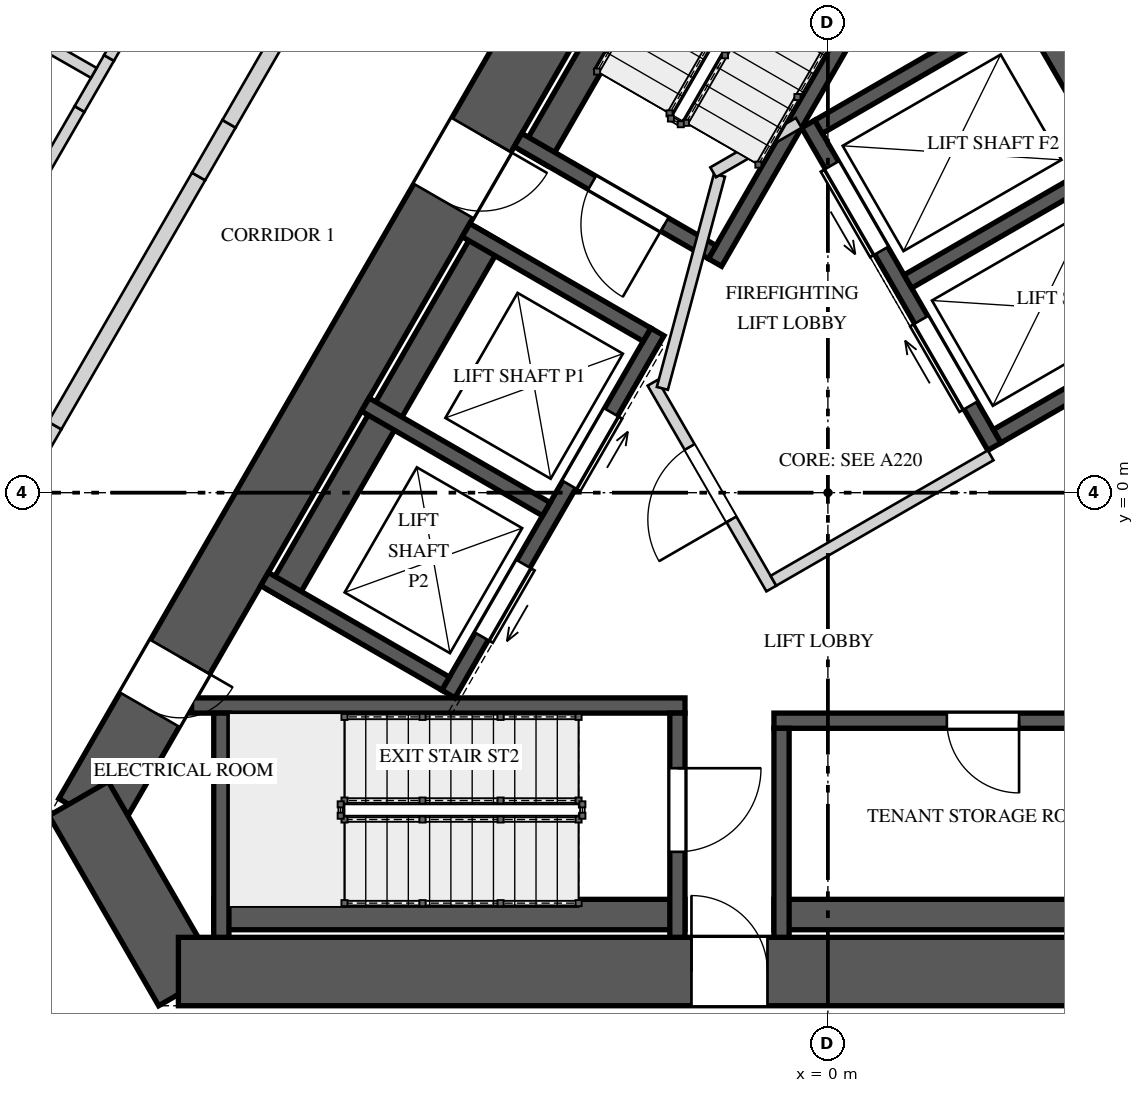
"""IFC4 building model, lengths in metres.
Left out: names, types, materials, properties, quantities, classifications, styles, units other than length and angle.
Written with IfcOpenShell. Run it as: python <this file> out.ifc"""

import sys

from ifc_helpers import new_model, si_unit, direction, frame, frame_2d, origin, place, context, subcontext, project, spatial, rectangle, extrude, element, fill, save


model = new_model("IFC4")
c1 = context("Model", 3, precision=1e-05, world=origin(), true_north=direction((0.0, 1.0)))
c2 = subcontext(c1, "Body", "Model", "MODEL_VIEW")
j1 = project(units=[si_unit("LENGTHUNIT", "METRE"), si_unit("PLANEANGLEUNIT", "RADIAN")], contexts=[c1])
p1 = place(None, origin())
s1 = spatial("IfcSite", under=j1, at=p1, CompositionType="ELEMENT")
p2 = place(p1, origin())
s2 = spatial("IfcBuilding", under=s1, at=p2, CompositionType="ELEMENT")
p3 = place(p2, frame((0.0, 0.0, 133.6)))
s3 = spatial("IfcBuildingStorey", under=s2, at=p3, CompositionType="ELEMENT", Elevation=133.6)
p4 = place(p3, frame((-1.184, 10.55, 0.0), z_axis=(0.0, 0.0, 1.0), x_axis=(-0.500004814304, -0.866022624227, 0.0)))
e1 = element("IfcWall", 1, at=p4, inside=s3, PredefinedType="SHEAR", context=c2, shape_type="SweptSolid", body=[
    extrude(rectangle(XDim=17.09, YDim=0.9, at=frame_2d((8.545, 0.0))), origin(), (0.0, 0.0, 1.0), 4.0),
])
p5 = place(p4, frame((6.75, 0.0, 0.0)))
e2 = element("IfcOpeningElement", 2, at=p5, cuts=e1, PredefinedType="OPENING", context=c2, shape_type="SweptSolid", body=[
    extrude(rectangle(XDim=1.0, YDim=2.4, at=frame_2d((0.5, 1.2))), frame((0.0, 0.46, 0.0), z_axis=(0.0, -1.0, 0.0), x_axis=(1.0, 0.0, 0.0)), (0.0, 0.0, 1.0), 0.92),
])
p6 = place(p4, frame((14.678, 0.0, 0.0)))
e3 = element("IfcOpeningElement", 3, at=p6, cuts=e1, PredefinedType="OPENING", context=c2, shape_type="SweptSolid", body=[
    extrude(rectangle(XDim=0.8, YDim=2.1, at=frame_2d((0.4, 1.05))), frame((0.0, 0.46, 0.0), z_axis=(0.0, -1.0, 0.0), x_axis=(1.0, 0.0, 0.0)), (0.0, 0.0, 1.0), 0.92),
])
p7 = place(p3, frame((-9.858, -4.025, 0.0), z_axis=(0.0, 0.0, 1.0), x_axis=(0.500059191753, -0.865991226713, 0.0)))
e4 = element("IfcWall", 4, at=p7, inside=s3, PredefinedType="SHEAR", context=c2, shape_type="SweptSolid", body=[
    extrude(rectangle(XDim=2.887, YDim=0.9, at=frame_2d((1.443, 0.0))), origin(), (0.0, 0.0, 1.0), 4.0),
])
p8 = place(p3, frame((-8.545, -6.3, 0.0), z_axis=(0.0, 0.0, 1.0), x_axis=(1.0, 0.0, 0.0)))
e5 = element("IfcWall", 5, at=p8, inside=s3, PredefinedType="SHEAR", context=c2, shape_type="SweptSolid", body=[
    extrude(rectangle(XDim=17.09, YDim=0.9, at=frame_2d((8.545, 0.0))), origin(), (0.0, 0.0, 1.0), 4.0),
])
p9 = place(p8, frame((6.75, 0.0, 0.0)))
e6 = element("IfcOpeningElement", 6, at=p9, cuts=e5, PredefinedType="OPENING", context=c2, shape_type="SweptSolid", body=[
    extrude(rectangle(XDim=1.0, YDim=2.4, at=frame_2d((0.5, 1.2))), frame((0.0, 0.46, 0.0), z_axis=(0.0, -1.0, 0.0), x_axis=(1.0, 0.0, 0.0)), (0.0, 0.0, 1.0), 0.92),
])
p10 = place(p3, frame((9.729, -4.25, 0.0), z_axis=(0.0, 0.0, 1.0), x_axis=(-0.500004814304, 0.866022624227, 0.0)))
e7 = element("IfcWall", 7, at=p10, inside=s3, PredefinedType="SHEAR", context=c2, shape_type="SweptSolid", body=[
    extrude(rectangle(XDim=17.09, YDim=0.9, at=frame_2d((8.545, 0.0))), origin(), (0.0, 0.0, 1.0), 4.0),
])
p11 = place(p10, frame((6.82, 0.0, 0.0)))
e8 = element("IfcOpeningElement", 8, at=p11, cuts=e7, PredefinedType="OPENING", context=c2, shape_type="SweptSolid", body=[
    extrude(rectangle(XDim=1.0, YDim=2.4, at=frame_2d((0.5, 1.2))), frame((0.0, 0.46, 0.0), z_axis=(0.0, -1.0, 0.0), x_axis=(1.0, 0.0, 0.0)), (0.0, 0.0, 1.0), 0.92),
])
p12 = place(p3, frame((-0.766, 9.772, 0.0), z_axis=(0.0, 0.0, 1.0), x_axis=(-0.500009909098, -0.866019682689, 0.0)))
e9 = element("IfcWall", 9, at=p12, inside=s3, PredefinedType="SOLIDWALL", context=c2, shape_type="SweptSolid", body=[
    extrude(rectangle(XDim=6.2, YDim=0.4, at=frame_2d((3.1, 0.0))), origin(), (0.0, 0.0, 1.0), 3.65),
])
p13 = place(p3, frame((1.761, 8.65, 0.0), z_axis=(0.0, 0.0, 1.0), x_axis=(-0.500010023241, -0.866019616786, 0.0)))
e10 = element("IfcWall", 10, at=p13, inside=s3, PredefinedType="SOLIDWALL", context=c2, shape_type="SweptSolid", body=[
    extrude(rectangle(XDim=6.491, YDim=0.2, at=frame_2d((3.246, 0.0))), origin(), (0.0, 0.0, 1.0), 3.65),
])
p14 = place(p3, frame((-1.521, 3.165, 0.0), z_axis=(0.0, 0.0, 1.0), x_axis=(-0.866039495442, 0.49997559174, 0.0)))
e11 = element("IfcWall", 11, at=p14, inside=s3, PredefinedType="SOLIDWALL", context=c2, shape_type="SweptSolid", body=[
    extrude(rectangle(XDim=2.95, YDim=0.2, at=frame_2d((1.475, 0.0))), origin(), (0.0, 0.0, 1.0), 3.65),
])
p15 = place(p14, frame((0.725, 0.0, 0.0)))
e12 = element("IfcOpeningElement", 12, at=p15, cuts=e11, PredefinedType="OPENING", context=c2, shape_type="SweptSolid", body=[
    extrude(rectangle(XDim=1.1, YDim=2.4, at=frame_2d((0.55, 1.2))), frame((0.0, 0.11, 0.0), z_axis=(0.0, -1.0, 0.0), x_axis=(1.0, 0.0, 0.0)), (0.0, 0.0, 1.0), 0.22),
])
p16 = place(p3, frame((-8.08, -5.55, 0.0), z_axis=(0.0, 0.0, 1.0), x_axis=(1.0, 0.0, 0.0)))
e13 = element("IfcWall", 13, at=p16, inside=s3, PredefinedType="SOLIDWALL", context=c2, shape_type="SweptSolid", body=[
    extrude(rectangle(XDim=6.2, YDim=0.4, at=frame_2d((3.1, 0.0))), origin(), (0.0, 0.0, 1.0), 3.65),
])
p17 = place(p3, frame((-8.372, -2.8, 0.0), z_axis=(0.0, 0.0, 1.0), x_axis=(1.0, 0.0, 0.0)))
e14 = element("IfcWall", 14, at=p17, inside=s3, PredefinedType="SOLIDWALL", context=c2, shape_type="SweptSolid", body=[
    extrude(rectangle(XDim=6.492, YDim=0.2, at=frame_2d((3.246, 0.0))), origin(), (0.0, 0.0, 1.0), 3.65),
])
p18 = place(p3, frame((-7.98, -2.9, 0.0), z_axis=(0.0, 0.0, 1.0), x_axis=(0.0, -1.0, 0.0)))
e15 = element("IfcWall", 15, at=p18, inside=s3, PredefinedType="SOLIDWALL", context=c2, shape_type="SweptSolid", body=[
    extrude(rectangle(XDim=2.95, YDim=0.2, at=frame_2d((1.475, 0.0))), origin(), (0.0, 0.0, 1.0), 3.65),
])
p19 = place(p3, frame((-1.98, -2.9, 0.0), z_axis=(0.0, 0.0, 1.0), x_axis=(0.0, -1.0, 0.0)))
e16 = element("IfcWall", 16, at=p19, inside=s3, PredefinedType="SOLIDWALL", context=c2, shape_type="SweptSolid", body=[
    extrude(rectangle(XDim=2.95, YDim=0.2, at=frame_2d((1.475, 0.0))), origin(), (0.0, 0.0, 1.0), 3.65),
])
p20 = place(p19, frame((0.725, 0.0, 0.0)))
e17 = element("IfcOpeningElement", 17, at=p20, cuts=e16, PredefinedType="OPENING", context=c2, shape_type="SweptSolid", body=[
    extrude(rectangle(XDim=1.1, YDim=2.4, at=frame_2d((0.55, 1.2))), frame((0.0, 0.11, 0.0), z_axis=(0.0, -1.0, 0.0), x_axis=(1.0, 0.0, 0.0)), (0.0, 0.0, 1.0), 0.22),
])
p21 = place(p3, frame((-2.243, 2.115, 0.0), z_axis=(0.0, 0.0, 1.0), x_axis=(-0.499996545922, -0.866027397988, 0.0)))
e18 = element("IfcWall", 18, at=p21, inside=s3, PredefinedType="SOLIDWALL", context=c2, shape_type="SweptSolid", body=[
    extrude(rectangle(XDim=5.5, YDim=0.2, at=frame_2d((2.75, 0.0))), origin(), (0.0, 0.0, 1.0), 3.65),
])
p22 = place(p21, frame((1.22, 0.0, 0.0)))
e19 = element("IfcOpeningElement", 19, at=p22, cuts=e18, PredefinedType="OPENING", context=c2, shape_type="SweptSolid", body=[
    extrude(rectangle(XDim=1.1, YDim=2.1, at=frame_2d((0.55, 1.05))), frame((0.0, 0.11, 0.0), z_axis=(0.0, -1.0, 0.0), x_axis=(1.0, 0.0, 0.0)), (0.0, 0.0, 1.0), 0.22),
])
p23 = place(p21, frame((3.525, 0.0, 0.0)))
e20 = element("IfcOpeningElement", 20, at=p23, cuts=e18, PredefinedType="OPENING", context=c2, shape_type="SweptSolid", body=[
    extrude(rectangle(XDim=1.1, YDim=2.1, at=frame_2d((0.55, 1.05))), frame((0.0, 0.11, 0.0), z_axis=(0.0, -1.0, 0.0), x_axis=(1.0, 0.0, 0.0)), (0.0, 0.0, 1.0), 0.22),
])
p24 = place(p3, frame((-4.451, 3.39, 0.0), z_axis=(0.0, 0.0, 1.0), x_axis=(-0.499996545922, -0.866027397988, 0.0)))
e21 = element("IfcWall", 21, at=p24, inside=s3, PredefinedType="SOLIDWALL", context=c2, shape_type="SweptSolid", body=[
    extrude(rectangle(XDim=5.5, YDim=0.4, at=frame_2d((2.75, 0.0))), origin(), (0.0, 0.0, 1.0), 3.65),
])
for number, where, z_axis, x_axis in (
    (22, (-2.38, 2.078, 0.0), (0.0, 0.0, 1.0), (-0.866, 0.5, 0.0)),
    (23, (-3.705, -0.217, 0.0), (0.0, 0.0, 1.0), (-0.866, 0.5, 0.0)),
):
    element("IfcWall", number, at=place(p3, frame(where, z_axis=z_axis, x_axis=x_axis)), inside=s3, PredefinedType="SOLIDWALL", context=c2, shape_type="SweptSolid", body=[
        extrude(rectangle(XDim=2.75, YDim=0.2, at=frame_2d((1.375, 0.0))), origin(), (0.0, 0.0, 1.0), 3.65),
    ])
p25 = place(p3, frame((-5.03, -2.512, 0.0), z_axis=(0.0, 0.0, 1.0), x_axis=(-0.866005201286, 0.500034990121, 0.0)))
e24 = element("IfcWall", 24, at=p25, inside=s3, PredefinedType="SOLIDWALL", context=c2, shape_type="SweptSolid", body=[
    extrude(rectangle(XDim=2.75, YDim=0.2, at=frame_2d((1.375, 0.0))), origin(), (0.0, 0.0, 1.0), 3.65),
])
p26 = place(p3, frame((4.79, -3.0, 0.0), z_axis=(0.0, 0.0, 1.0), x_axis=(-1.0, 0.0, 0.0)))
e25 = element("IfcWall", 25, at=p26, inside=s3, PredefinedType="SOLIDWALL", context=c2, shape_type="SweptSolid", body=[
    extrude(rectangle(XDim=5.5, YDim=0.2, at=frame_2d((2.75, 0.0))), origin(), (0.0, 0.0, 1.0), 3.65),
])
p27 = place(p26, frame((2.275, 0.0, 0.0)))
e26 = element("IfcOpeningElement", 26, at=p27, cuts=e25, PredefinedType="OPENING", context=c2, shape_type="SweptSolid", body=[
    extrude(rectangle(XDim=0.95, YDim=2.4, at=frame_2d((0.475, 1.2))), frame((0.0, 0.11, 0.0), z_axis=(0.0, -1.0, 0.0), x_axis=(1.0, 0.0, 0.0)), (0.0, 0.0, 1.0), 0.22),
])
p28 = place(p3, frame((-0.71, -5.55, 0.0), z_axis=(0.0, 0.0, 1.0), x_axis=(1.0, 0.0, 0.0)))
e27 = element("IfcWall", 27, at=p28, inside=s3, PredefinedType="SOLIDWALL", context=c2, shape_type="SweptSolid", body=[
    extrude(rectangle(XDim=5.5, YDim=0.4, at=frame_2d((2.75, 0.0))), origin(), (0.0, 0.0, 1.0), 3.65),
])
p29 = place(p3, frame((-0.61, -3.1, 0.0), z_axis=(0.0, 0.0, 1.0), x_axis=(0.0, -1.0, 0.0)))
e28 = element("IfcWall", 28, at=p29, inside=s3, PredefinedType="SOLIDWALL", context=c2, shape_type="SweptSolid", body=[
    extrude(rectangle(XDim=2.75, YDim=0.2, at=frame_2d((1.375, 0.0))), origin(), (0.0, 0.0, 1.0), 3.65),
])
p30 = place(p3, frame((2.19, 0.606, 0.0), z_axis=(0.0, 0.0, 1.0), x_axis=(-0.500002801628, 0.866023786258, 0.0)))
e29 = element("IfcWall", 29, at=p30, inside=s3, PredefinedType="SOLIDWALL", context=c2, shape_type="SweptSolid", body=[
    extrude(rectangle(XDim=4.9, YDim=0.2, at=frame_2d((2.45, 0.0))), origin(), (0.0, 0.0, 1.0), 3.65),
])
p31 = place(p30, frame((0.625, 0.0, 0.0)))
e30 = element("IfcOpeningElement", 30, at=p31, cuts=e29, PredefinedType="OPENING", context=c2, shape_type="SweptSolid", body=[
    extrude(rectangle(XDim=1.3, YDim=2.1, at=frame_2d((0.65, 1.05))), frame((0.0, 0.11, 0.0), z_axis=(0.0, -1.0, 0.0), x_axis=(1.0, 0.0, 0.0)), (0.0, 0.0, 1.0), 0.22),
])
p32 = place(p30, frame((2.975, 0.0, 0.0)))
e31 = element("IfcOpeningElement", 31, at=p32, cuts=e29, PredefinedType="OPENING", context=c2, shape_type="SweptSolid", body=[
    extrude(rectangle(XDim=1.3, YDim=2.1, at=frame_2d((0.65, 1.05))), frame((0.0, 0.11, 0.0), z_axis=(0.0, -1.0, 0.0), x_axis=(1.0, 0.0, 0.0)), (0.0, 0.0, 1.0), 0.22),
])
p33 = place(p3, frame((5.092, 2.281, 0.0), z_axis=(0.0, 0.0, 1.0), x_axis=(-0.500018594424, 0.866014668023, 0.0)))
e32 = element("IfcWall", 32, at=p33, inside=s3, PredefinedType="SOLIDWALL", context=c2, shape_type="SweptSolid", body=[
    extrude(rectangle(XDim=4.9, YDim=0.4, at=frame_2d((2.45, 0.0))), origin(), (0.0, 0.0, 1.0), 3.65),
])
for number, where, z_axis, x_axis in (
    (33, (2.227, 0.743, 0.0), (0.0, 0.0, 1.0), (0.866, 0.5, 0.0)),
    (34, (1.052, 2.778, 0.0), (0.0, 0.0, 1.0), (0.866, 0.5, 0.0)),
):
    element("IfcWall", number, at=place(p3, frame(where, z_axis=z_axis, x_axis=x_axis)), inside=s3, PredefinedType="SOLIDWALL", context=c2, shape_type="SweptSolid", body=[
        extrude(rectangle(XDim=3.55, YDim=0.2, at=frame_2d((1.775, 0.0))), origin(), (0.0, 0.0, 1.0), 3.65),
    ])
p34 = place(p3, frame((-0.123, 4.813, 0.0), z_axis=(0.0, 0.0, 1.0), x_axis=(0.865995461329, 0.500051858269, 0.0)))
e35 = element("IfcWall", 35, at=p34, inside=s3, PredefinedType="SOLIDWALL", context=c2, shape_type="SweptSolid", body=[
    extrude(rectangle(XDim=3.55, YDim=0.2, at=frame_2d((1.775, 0.0))), origin(), (0.0, 0.0, 1.0), 3.65),
])
p35 = place(p3, frame((-0.744, -1.261, 0.0), z_axis=(0.0, 0.0, 1.0), x_axis=(-0.500004234368, 0.866022959057, 0.0)))
e36 = element("IfcWall", 36, at=p35, inside=s3, PredefinedType="PARTITIONING", context=c2, shape_type="SweptSolid", body=[
    extrude(rectangle(XDim=3.125, YDim=0.15, at=frame_2d((1.562, 0.0))), origin(), (0.0, 0.0, 1.0), 3.65),
])
p36 = place(p35, frame((1.05, 0.0, 0.0)))
e37 = element("IfcOpeningElement", 37, at=p36, cuts=e36, PredefinedType="OPENING", context=c2, shape_type="SweptSolid", body=[
    extrude(rectangle(XDim=1.1, YDim=2.4, at=frame_2d((0.55, 1.2))), frame((0.0, 0.085, 0.0), z_axis=(0.0, -1.0, 0.0), x_axis=(1.0, 0.0, 0.0)), (0.0, 0.0, 1.0), 0.17),
])
p37 = place(p3, frame((-0.717, -1.159, 0.0), z_axis=(0.0, 0.0, 1.0), x_axis=(0.866008176907, 0.50002983664, 0.0)))
e38 = element("IfcWall", 38, at=p37, inside=s3, PredefinedType="PARTITIONING", context=c2, shape_type="SweptSolid", body=[
    extrude(rectangle(XDim=3.3, YDim=0.15, at=frame_2d((1.65, 0.0))), origin(), (0.0, 0.0, 1.0), 3.65),
])
p38 = place(p3, frame((-2.178, 1.372, 0.0), z_axis=(0.0, 0.0, 1.0), x_axis=(0.258808958833, 0.96592852884, 0.0)))
e39 = element("IfcWall", 39, at=p38, inside=s3, PredefinedType="PARTITIONING", context=c2, shape_type="SweptSolid", body=[
    extrude(rectangle(XDim=2.903, YDim=0.15, at=frame_2d((1.451, 0.0))), origin(), (0.0, 0.0, 1.0), 3.65),
])
p39 = place(p3, frame((-1.51, 4.215, 0.0), z_axis=(0.0, 0.0, 1.0), x_axis=(0.866085525409, 0.49989585183, 0.0)))
e40 = element("IfcWall", 40, at=p39, inside=s3, PredefinedType="PARTITIONING", context=c2, shape_type="SweptSolid", body=[
    extrude(rectangle(XDim=1.3, YDim=0.15, at=frame_2d((0.65, 0.0))), origin(), (0.0, 0.0, 1.0), 3.65),
])
p40 = place(p3, frame((-12.195, 0.977, 0.0), z_axis=(0.0, 0.0, 1.0), x_axis=(0.499993726502, 0.86602902576, 0.0)))
e41 = element("IfcWall", 41, at=p40, inside=s3, PredefinedType="PARTITIONING", context=c2, shape_type="SweptSolid", body=[
    extrude(rectangle(XDim=4.7, YDim=0.15, at=frame_2d((2.35, 0.0))), origin(), (0.0, 0.0, 1.0), 3.65),
])
p41 = place(p40, frame((2.03, 0.0, 0.0)))
e42 = element("IfcOpeningElement", 42, at=p41, cuts=e41, PredefinedType="OPENING", context=c2, shape_type="SweptSolid", body=[
    extrude(rectangle(XDim=0.95, YDim=2.4, at=frame_2d((0.475, 1.2))), frame((0.0, 0.085, 0.0), z_axis=(0.0, -1.0, 0.0), x_axis=(1.0, 0.0, 0.0)), (0.0, 0.0, 1.0), 0.17),
])
p42 = place(p3, frame((-9.845, 5.048, 0.0), z_axis=(0.0, 0.0, 1.0), x_axis=(0.499967891604, 0.866043940782, 0.0)))
e43 = element("IfcWall", 43, at=p42, inside=s3, PredefinedType="PARTITIONING", context=c2, shape_type="SweptSolid", body=[
    extrude(rectangle(XDim=0.775, YDim=0.15, at=frame_2d((0.387, 0.0))), origin(), (0.0, 0.0, 1.0), 2.75),
])
p43 = place(p3, frame((-9.458, 5.719, 0.0), z_axis=(0.0, 0.0, 1.0), x_axis=(0.499996941814, 0.866027169422, 0.0)))
e44 = element("IfcWall", 44, at=p43, inside=s3, PredefinedType="PARTITIONING", context=c2, shape_type="SweptSolid", body=[
    extrude(rectangle(XDim=2.797, YDim=0.15, at=frame_2d((1.399, 0.0))), origin(), (0.0, 0.0, 1.0), 3.65),
])
p44 = place(p43, frame((1.1, 0.0, 0.0)))
e45 = element("IfcOpeningElement", 45, at=p44, cuts=e44, PredefinedType="OPENING", context=c2, shape_type="SweptSolid", body=[
    extrude(rectangle(XDim=0.95, YDim=2.4, at=frame_2d((0.475, 1.2))), frame((0.0, 0.085, 0.0), z_axis=(0.0, -1.0, 0.0), x_axis=(1.0, 0.0, 0.0)), (0.0, 0.0, 1.0), 0.17),
])
p45 = place(p3, frame((-9.658, 5.522, 0.0), z_axis=(0.0, 0.0, 1.0), x_axis=(-0.868078092768, 0.496427663267, 0.0)))
e46 = element("IfcWall", 46, at=p45, inside=s3, PredefinedType="PARTITIONING", context=c2, shape_type="SweptSolid", body=[
    extrude(rectangle(XDim=7.467, YDim=0.15, at=frame_2d((3.733, 0.0))), origin(), (0.0, 0.0, 1.0), 2.75),
])
p46 = place(p3, frame((-10.564, 0.203, 0.0), z_axis=(0.0, 0.0, 1.0), x_axis=(0.499982474044, 0.866035522163, 0.0)))
e47 = element("IfcWall", 47, at=p46, inside=s3, PredefinedType="SOLIDWALL", context=c2, shape_type="SweptSolid", body=[
    extrude(rectangle(XDim=0.786, YDim=0.2, at=frame_2d((0.393, 0.0))), origin(), (0.0, 0.0, 1.0), 2.95),
])
p47 = place(p3, frame((-10.171, 0.884, 0.0), z_axis=(0.0, 0.0, 1.0), x_axis=(0.499998034377, 0.866026538634, 0.0)))
e48 = element("IfcWall", 48, at=p47, inside=s3, PredefinedType="SOLIDWALL", context=c2, shape_type="SweptSolid", body=[
    extrude(rectangle(XDim=3.783, YDim=0.2, at=frame_2d((1.892, 0.0))), origin(), (0.0, 0.0, 1.0), 3.65),
])
p48 = place(p3, frame((-8.279, 4.16, 0.0), z_axis=(0.0, 0.0, 1.0), x_axis=(0.500109828528, 0.865961984968, 0.0)))
e49 = element("IfcWall", 49, at=p48, inside=s3, PredefinedType="SOLIDWALL", context=c2, shape_type="SweptSolid", body=[
    extrude(rectangle(XDim=0.8, YDim=0.2, at=frame_2d((0.4, 0.0))), origin(), (0.0, 0.0, 1.0), 2.75),
])
p49 = place(p3, frame((-7.879, 4.853, 0.0), z_axis=(0.0, 0.0, 1.0), x_axis=(0.499948868167, 0.866054922749, 0.0)))
e50 = element("IfcWall", 50, at=p49, inside=s3, PredefinedType="SOLIDWALL", context=c2, shape_type="SweptSolid", body=[
    extrude(rectangle(XDim=2.178, YDim=0.2, at=frame_2d((1.089, 0.0))), origin(), (0.0, 0.0, 1.0), 3.65),
])
p50 = place(p15, origin())
e51 = element("IfcDoor", 51, at=p50, inside=s3, OperationType="SINGLE_SWING_RIGHT", PredefinedType="DOOR", context=c2, shape_type="SweptSolid", body=[
    extrude(rectangle(XDim=1.1, YDim=2.4, at=frame_2d((0.55, 1.2))), frame((0.0, 0.025, 0.0), z_axis=(0.0, -1.0, 0.0), x_axis=(1.0, 0.0, 0.0)), (0.0, 0.0, 1.0), 0.05),
])
fill(e12, e51)
p51 = place(p20, origin())
e52 = element("IfcDoor", 52, at=p51, inside=s3, OperationType="SINGLE_SWING_LEFT", PredefinedType="DOOR", context=c2, shape_type="SweptSolid", body=[
    extrude(rectangle(XDim=1.1, YDim=2.4, at=frame_2d((0.55, 1.2))), frame((0.0, 0.025, 0.0), z_axis=(0.0, -1.0, 0.0), x_axis=(1.0, 0.0, 0.0)), (0.0, 0.0, 1.0), 0.05),
])
fill(e17, e52)
p52 = place(p22, origin())
e53 = element("IfcDoor", 53, at=p52, inside=s3, OperationType="SLIDING_TO_LEFT", PredefinedType="DOOR", context=c2, shape_type="SweptSolid", body=[
    extrude(rectangle(XDim=1.1, YDim=2.1, at=frame_2d((0.55, 1.05))), frame((0.0, 0.025, 0.0), z_axis=(0.0, -1.0, 0.0), x_axis=(1.0, 0.0, 0.0)), (0.0, 0.0, 1.0), 0.05),
])
fill(e19, e53)
p53 = place(p23, origin())
e54 = element("IfcDoor", 54, at=p53, inside=s3, OperationType="SLIDING_TO_RIGHT", PredefinedType="DOOR", context=c2, shape_type="SweptSolid", body=[
    extrude(rectangle(XDim=1.1, YDim=2.1, at=frame_2d((0.55, 1.05))), frame((0.0, 0.025, 0.0), z_axis=(0.0, -1.0, 0.0), x_axis=(1.0, 0.0, 0.0)), (0.0, 0.0, 1.0), 0.05),
])
fill(e20, e54)
p54 = place(p27, origin())
e55 = element("IfcDoor", 55, at=p54, inside=s3, OperationType="SINGLE_SWING_LEFT", PredefinedType="DOOR", context=c2, shape_type="SweptSolid", body=[
    extrude(rectangle(XDim=0.95, YDim=2.4, at=frame_2d((0.475, 1.2))), frame((0.0, 0.025, 0.0), z_axis=(0.0, -1.0, 0.0), x_axis=(1.0, 0.0, 0.0)), (0.0, 0.0, 1.0), 0.05),
])
fill(e26, e55)
p55 = place(p31, origin())
e56 = element("IfcDoor", 56, at=p55, inside=s3, OperationType="SLIDING_TO_RIGHT", PredefinedType="DOOR", context=c2, shape_type="SweptSolid", body=[
    extrude(rectangle(XDim=1.3, YDim=2.1, at=frame_2d((0.65, 1.05))), frame((0.0, 0.025, 0.0), z_axis=(0.0, -1.0, 0.0), x_axis=(1.0, 0.0, 0.0)), (0.0, 0.0, 1.0), 0.05),
])
fill(e30, e56)
p56 = place(p32, origin())
e57 = element("IfcDoor", 57, at=p56, inside=s3, OperationType="SLIDING_TO_LEFT", PredefinedType="DOOR", context=c2, shape_type="SweptSolid", body=[
    extrude(rectangle(XDim=1.3, YDim=2.1, at=frame_2d((0.65, 1.05))), frame((0.0, 0.025, 0.0), z_axis=(0.0, -1.0, 0.0), x_axis=(1.0, 0.0, 0.0)), (0.0, 0.0, 1.0), 0.05),
])
fill(e31, e57)
p57 = place(p36, origin())
e58 = element("IfcDoor", 58, at=p57, inside=s3, OperationType="SINGLE_SWING_RIGHT", PredefinedType="DOOR", context=c2, shape_type="SweptSolid", body=[
    extrude(rectangle(XDim=1.1, YDim=2.4, at=frame_2d((0.55, 1.2))), frame((0.0, 0.025, 0.0), z_axis=(0.0, -1.0, 0.0), x_axis=(1.0, 0.0, 0.0)), (0.0, 0.0, 1.0), 0.05),
])
fill(e37, e58)
p58 = place(p5, origin())
e59 = element("IfcDoor", 59, at=p58, inside=s3, OperationType="SINGLE_SWING_LEFT", PredefinedType="DOOR", context=c2, shape_type="SweptSolid", body=[
    extrude(rectangle(XDim=1.0, YDim=2.4, at=frame_2d((0.5, 1.2))), frame((0.0, 0.025, 0.0), z_axis=(0.0, -1.0, 0.0), x_axis=(1.0, 0.0, 0.0)), (0.0, 0.0, 1.0), 0.05),
])
fill(e2, e59)
p59 = place(p9, origin())
e60 = element("IfcDoor", 60, at=p59, inside=s3, OperationType="SINGLE_SWING_RIGHT", PredefinedType="DOOR", context=c2, shape_type="SweptSolid", body=[
    extrude(rectangle(XDim=1.0, YDim=2.4, at=frame_2d((0.5, 1.2))), frame((0.0, 0.025, 0.0), z_axis=(0.0, -1.0, 0.0), x_axis=(1.0, 0.0, 0.0)), (0.0, 0.0, 1.0), 0.05),
])
fill(e6, e60)
p60 = place(p6, origin())
e61 = element("IfcDoor", 61, at=p60, inside=s3, OperationType="SINGLE_SWING_RIGHT", PredefinedType="DOOR", context=c2, shape_type="SweptSolid", body=[
    extrude(rectangle(XDim=0.8, YDim=2.1, at=frame_2d((0.4, 1.05))), frame((0.0, 0.025, 0.0), z_axis=(0.0, -1.0, 0.0), x_axis=(1.0, 0.0, 0.0)), (0.0, 0.0, 1.0), 0.05),
])
fill(e3, e61)
save(model, sys.argv[1])
